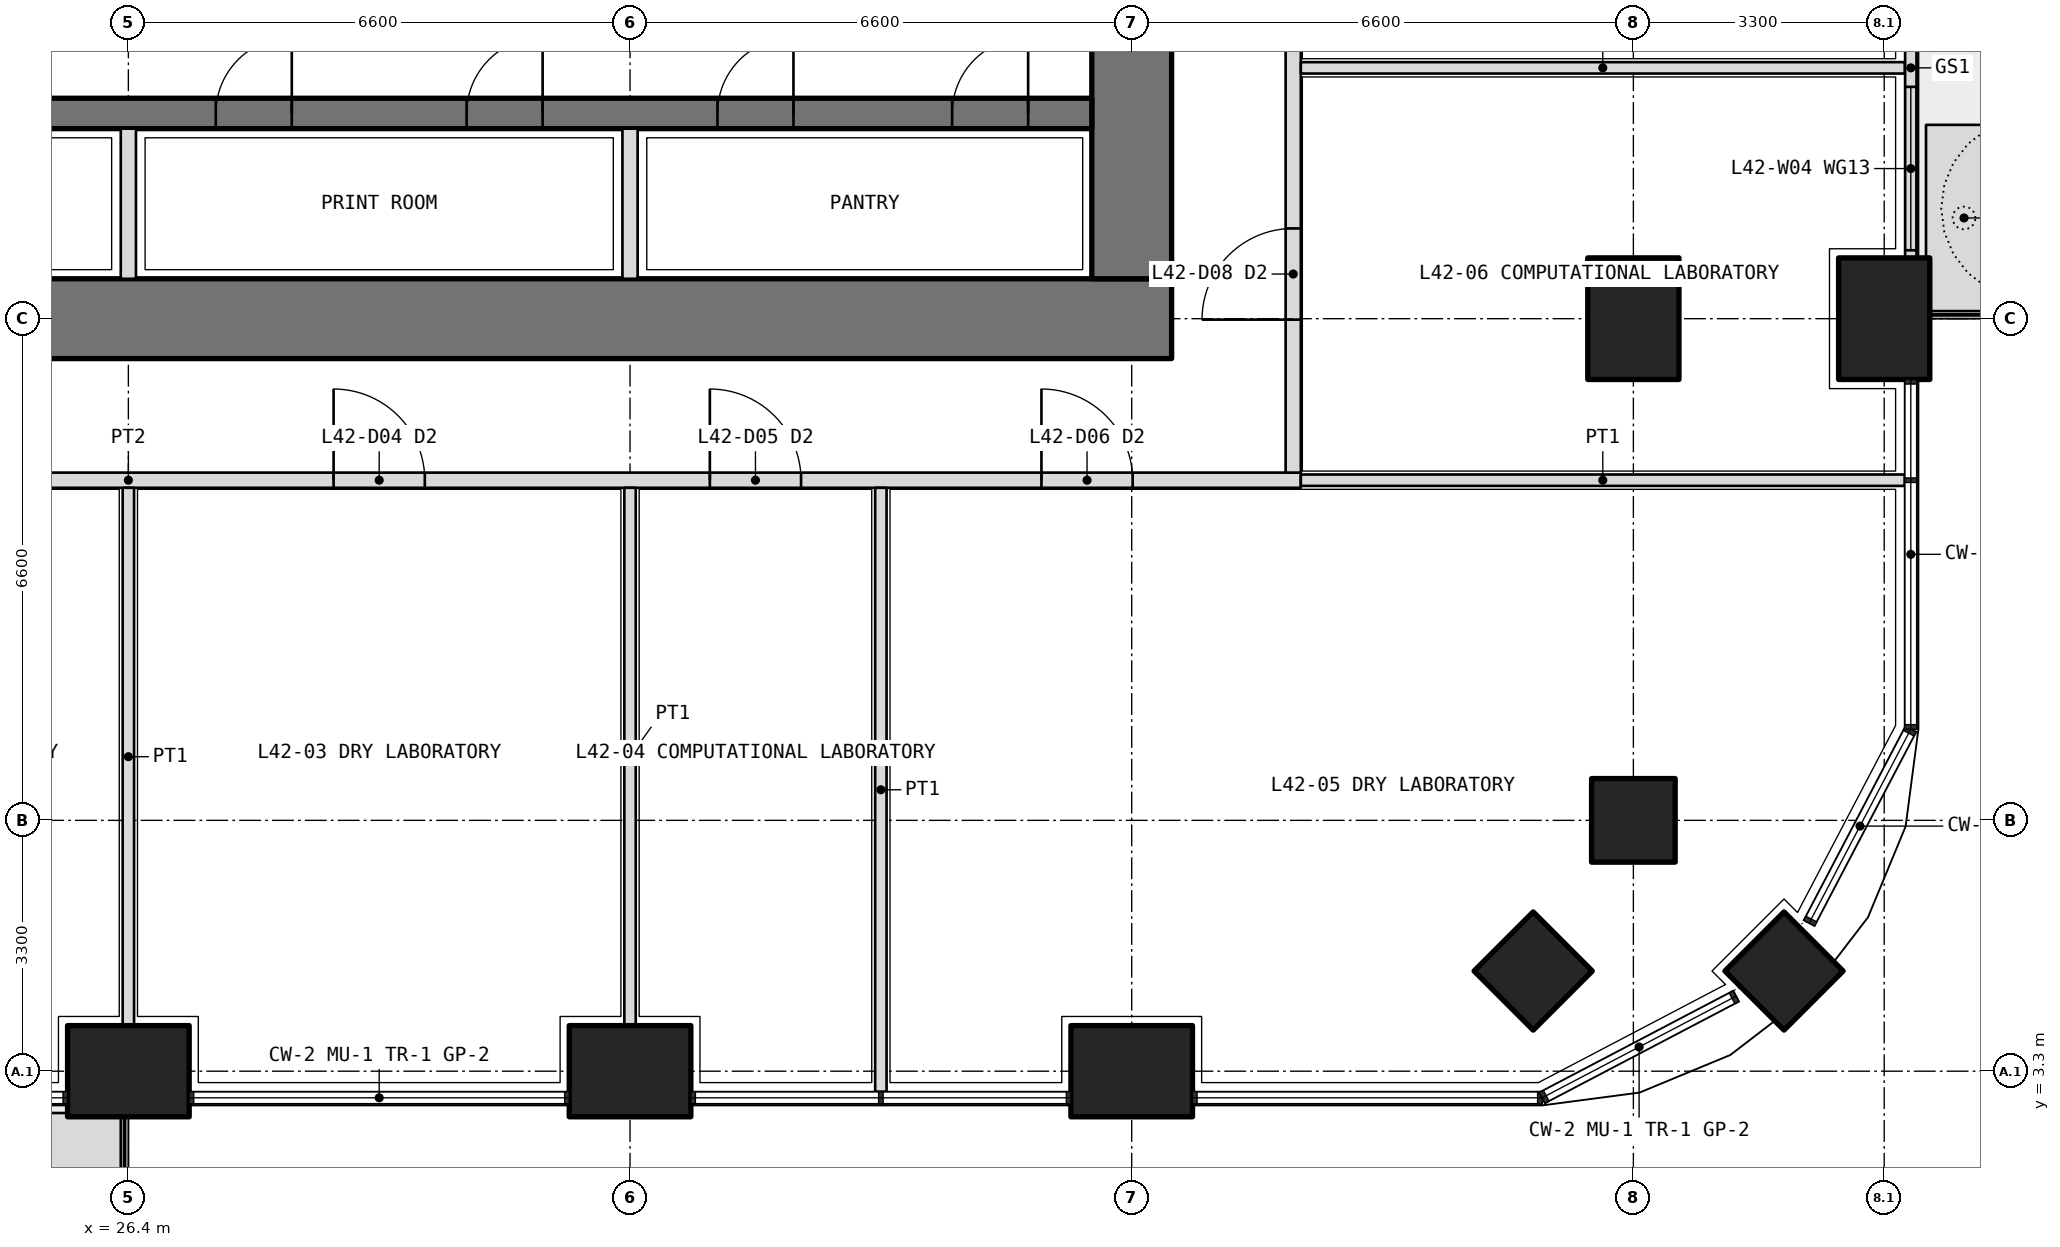
"""IFC4 building model, lengths in metres.
Left out: names, types, materials, properties, quantities, classifications, styles, units other than length and angle.
Written with IfcOpenShell. Run it as: python <this file> out.ifc"""

import sys

from ifc_helpers import new_model, si_unit, direction, frame, frame_2d, origin, origin_2d, place, context, subcontext, project, spatial, polyline, rectangle, outline, extrude, element, fill, save


model = new_model("IFC4")
c1 = context("Model", 3, precision=1e-05, world=origin(), true_north=direction((0.0, 1.0)))
c2 = subcontext(c1, "Body", "Model", "MODEL_VIEW")
j1 = project(units=[si_unit("LENGTHUNIT", "METRE"), si_unit("PLANEANGLEUNIT", "RADIAN")], contexts=[c1])
p1 = place(None, origin())
s1 = spatial("IfcSite", under=j1, at=p1, CompositionType="ELEMENT")
p2 = place(p1, origin())
s2 = spatial("IfcBuilding", under=s1, at=p2, CompositionType="ELEMENT")
p3 = place(p2, frame((0.0, 0.0, 185.1)))
s3 = spatial("IfcBuildingStorey", under=s2, at=p3, CompositionType="ELEMENT", Elevation=185.1)
p4 = place(p3, frame((48.182, 4.618, 0.0), z_axis=(0.0, 0.0, 1.0), x_axis=(0.707106781187, 0.707106781187, 0.0)))
e1 = element("IfcColumn", 1, at=p4, inside=s3, PredefinedType="COLUMN", context=c2, shape_type="SweptSolid", body=[
    extrude(rectangle(XDim=1.1, YDim=1.1, at=origin_2d()), origin(), (0.0, 0.0, 1.0), 4.2),
])
for number, where, z_axis, x_axis in (
    (2, (26.4, 3.3, 0.0), (0.0, 0.0, 1.0), (1.0, 0.0, 0.0)),
    (3, (33.0, 3.3, 0.0), (0.0, 0.0, 1.0), (1.0, 0.0, 0.0)),
    (4, (39.6, 3.3, 0.0), (0.0, 0.0, 1.0), (1.0, 0.0, 0.0)),
    (5, (49.5, 13.2, 0.0), (0.0, 0.0, 1.0), (0.0, 1.0, 0.0)),
):
    element("IfcColumn", number, at=place(p3, frame(where, z_axis=z_axis, x_axis=x_axis)), inside=s3, PredefinedType="COLUMN", context=c2, shape_type="SweptSolid", body=[
        extrude(rectangle(XDim=1.6, YDim=1.2, at=origin_2d()), origin(), (0.0, 0.0, 1.0), 4.2),
    ])
for number, where, z_axis, x_axis in (
    (6, (46.2, 6.6, 0.0), (0.0, 0.0, 1.0), (1.0, 0.0, 0.0)),
    (7, (44.882, 4.618, 0.0), (0.0, 0.0, 1.0), (0.707, 0.707, 0.0)),
):
    element("IfcColumn", number, at=place(p3, frame(where, z_axis=z_axis, x_axis=x_axis)), inside=s3, PredefinedType="COLUMN", context=c2, shape_type="SweptSolid", body=[
        extrude(rectangle(XDim=1.1, YDim=1.1, at=origin_2d()), origin(), (0.0, 0.0, 1.0), 4.2),
    ])
p5 = place(p3, frame((46.2, 13.2, 0.0), z_axis=(0.0, 0.0, 1.0), x_axis=(0.0, 1.0, 0.0)))
e8 = element("IfcColumn", 8, at=p5, inside=s3, PredefinedType="COLUMN", context=c2, shape_type="SweptSolid", body=[
    extrude(rectangle(XDim=1.6, YDim=1.2, at=origin_2d()), origin(), (0.0, 0.0, 1.0), 4.2),
])
p6 = place(p3, origin())
e9 = element("IfcWall", 9, at=p6, inside=s3, PredefinedType="USERDEFINED", context=c2, shape_type="SweptSolid", body=[
    extrude(outline(polyline([(17.25, 1.75), (26.3, 1.75), (26.3, 2.75), (17.25, 2.75), (17.25, 1.75)]), holes=[polyline([(17.4, 1.9), (26.15, 1.9), (26.15, 2.6), (17.4, 2.6), (17.4, 1.9)])]), origin(), (0.0, 0.0, 1.0), 1.05),
])
p7 = place(p3, origin())
e10 = element("IfcWall", 10, at=p7, inside=s3, PredefinedType="USERDEFINED", context=c2, shape_type="SweptSolid", body=[
    extrude(outline(polyline([(50.05, 13.3), (51.05, 13.3), (51.05, 15.75), (50.05, 15.75), (50.05, 13.3)]), holes=[polyline([(50.2, 13.45), (50.9, 13.45), (50.9, 15.6), (50.2, 15.6), (50.2, 13.45)])]), origin(), (0.0, 0.0, 1.0), 1.05),
])
p8 = place(p3, frame((49.85, 14.0, 0.0), z_axis=(0.0, 0.0, 1.0), x_axis=(0.0, 1.0, 0.0)))
e11 = element("IfcWall", 11, at=p8, inside=s3, PredefinedType="SOLIDWALL", context=c2, shape_type="SweptSolid", body=[
    extrude(rectangle(XDim=5.0, YDim=0.15, at=frame_2d((2.5, 0.0))), origin(), (0.0, 0.0, 1.0), 2.7),
])
p9 = place(p8, frame((2.75, 0.0, 0.0)))
e12 = element("IfcOpeningElement", 12, at=p9, cuts=e11, PredefinedType="OPENING", context=c2, shape_type="SweptSolid", body=[
    extrude(rectangle(XDim=1.0, YDim=2.4, at=frame_2d((0.5, 1.2))), frame((0.0, 0.085, 0.0), z_axis=(0.0, -1.0, 0.0), x_axis=(1.0, 0.0, 0.0)), (0.0, 0.0, 1.0), 0.17),
])
p10 = place(p8, frame((0.1, 0.0, 0.1)))
e13 = element("IfcOpeningElement", 13, at=p10, cuts=e11, PredefinedType="OPENING", context=c2, shape_type="SweptSolid", body=[
    extrude(rectangle(XDim=2.15, YDim=2.3, at=frame_2d((1.075, 1.15))), frame((0.0, 0.085, 0.0), z_axis=(0.0, -1.0, 0.0), x_axis=(1.0, 0.0, 0.0)), (0.0, 0.0, 1.0), 0.17),
])
p11 = place(p8, frame((3.85, 0.0, 0.1)))
e14 = element("IfcOpeningElement", 14, at=p11, cuts=e11, PredefinedType="OPENING", context=c2, shape_type="SweptSolid", body=[
    extrude(rectangle(XDim=1.05, YDim=2.3, at=frame_2d((0.525, 1.15))), frame((0.0, 0.085, 0.0), z_axis=(0.0, -1.0, 0.0), x_axis=(1.0, 0.0, 0.0)), (0.0, 0.0, 1.0), 0.17),
])
p12 = place(p3, frame((12.675, 13.2, 0.0), z_axis=(0.0, 0.0, 1.0), x_axis=(1.0, 0.0, 0.0)))
e15 = element("IfcWall", 15, at=p12, inside=s3, PredefinedType="SHEAR", context=c2, shape_type="SweptSolid", body=[
    extrude(rectangle(XDim=27.45, YDim=1.05, at=frame_2d((13.725, 0.0))), origin(), (0.0, 0.0, 1.0), 4.2),
])
p13 = place(p3, frame((39.6, 13.725, 0.0), z_axis=(0.0, 0.0, 1.0), x_axis=(0.0, 1.0, 0.0)))
e16 = element("IfcWall", 16, at=p13, inside=s3, PredefinedType="SHEAR", context=c2, shape_type="SweptSolid", body=[
    extrude(rectangle(XDim=18.75, YDim=1.05, at=frame_2d((9.375, 0.0))), origin(), (0.0, 0.0, 1.0), 4.2),
])
p14 = place(p13, frame((3.025, 0.0, 0.0)))
e17 = element("IfcOpeningElement", 17, at=p14, cuts=e16, PredefinedType="OPENING", context=c2, shape_type="SweptSolid", body=[
    extrude(rectangle(XDim=1.6, YDim=2.1, at=frame_2d((0.8, 1.05))), frame((0.0, 0.535, 0.0), z_axis=(0.0, -1.0, 0.0), x_axis=(1.0, 0.0, 0.0)), (0.0, 0.0, 1.0), 1.07),
])
p15 = place(p13, frame((13.825, 0.0, 0.0)))
e18 = element("IfcOpeningElement", 18, at=p15, cuts=e16, PredefinedType="OPENING", context=c2, shape_type="SweptSolid", body=[
    extrude(rectangle(XDim=1.6, YDim=2.1, at=frame_2d((0.8, 1.05))), frame((0.0, 0.535, 0.0), z_axis=(0.0, -1.0, 0.0), x_axis=(1.0, 0.0, 0.0)), (0.0, 0.0, 1.0), 1.07),
])
p16 = place(p3, frame((13.725, 15.9, 0.0), z_axis=(0.0, 0.0, 1.0), x_axis=(1.0, 0.0, 0.0)))
e19 = element("IfcWall", 19, at=p16, inside=s3, PredefinedType="SHEAR", context=c2, shape_type="SweptSolid", body=[
    extrude(rectangle(XDim=25.35, YDim=0.4, at=frame_2d((12.675, 0.0))), origin(), (0.0, 0.0, 1.0), 4.2),
])
p17 = place(p16, frame((0.837, 0.0, 0.0)))
e20 = element("IfcOpeningElement", 20, at=p17, cuts=e19, PredefinedType="OPENING", context=c2, shape_type="SweptSolid", body=[
    extrude(rectangle(XDim=1.0, YDim=2.1, at=frame_2d((0.5, 1.05))), frame((0.0, 0.21, 0.0), z_axis=(0.0, -1.0, 0.0), x_axis=(1.0, 0.0, 0.0)), (0.0, 0.0, 1.0), 0.42),
])
p18 = place(p16, frame((3.925, 0.0, 0.0)))
e21 = element("IfcOpeningElement", 21, at=p18, cuts=e19, PredefinedType="OPENING", context=c2, shape_type="SweptSolid", body=[
    extrude(rectangle(XDim=1.0, YDim=2.1, at=frame_2d((0.5, 1.05))), frame((0.0, 0.21, 0.0), z_axis=(0.0, -1.0, 0.0), x_axis=(1.0, 0.0, 0.0)), (0.0, 0.0, 1.0), 0.42),
])
p19 = place(p16, frame((7.225, 0.0, 0.0)))
e22 = element("IfcOpeningElement", 22, at=p19, cuts=e19, PredefinedType="OPENING", context=c2, shape_type="SweptSolid", body=[
    extrude(rectangle(XDim=1.0, YDim=2.1, at=frame_2d((0.5, 1.05))), frame((0.0, 0.21, 0.0), z_axis=(0.0, -1.0, 0.0), x_axis=(1.0, 0.0, 0.0)), (0.0, 0.0, 1.0), 0.42),
])
p20 = place(p16, frame((10.525, 0.0, 0.0)))
e23 = element("IfcOpeningElement", 23, at=p20, cuts=e19, PredefinedType="OPENING", context=c2, shape_type="SweptSolid", body=[
    extrude(rectangle(XDim=1.0, YDim=2.1, at=frame_2d((0.5, 1.05))), frame((0.0, 0.21, 0.0), z_axis=(0.0, -1.0, 0.0), x_axis=(1.0, 0.0, 0.0)), (0.0, 0.0, 1.0), 0.42),
])
p21 = place(p16, frame((13.825, 0.0, 0.0)))
e24 = element("IfcOpeningElement", 24, at=p21, cuts=e19, PredefinedType="OPENING", context=c2, shape_type="SweptSolid", body=[
    extrude(rectangle(XDim=1.0, YDim=2.1, at=frame_2d((0.5, 1.05))), frame((0.0, 0.21, 0.0), z_axis=(0.0, -1.0, 0.0), x_axis=(1.0, 0.0, 0.0)), (0.0, 0.0, 1.0), 0.42),
])
p22 = place(p16, frame((17.125, 0.0, 0.0)))
e25 = element("IfcOpeningElement", 25, at=p22, cuts=e19, PredefinedType="OPENING", context=c2, shape_type="SweptSolid", body=[
    extrude(rectangle(XDim=1.0, YDim=2.1, at=frame_2d((0.5, 1.05))), frame((0.0, 0.21, 0.0), z_axis=(0.0, -1.0, 0.0), x_axis=(1.0, 0.0, 0.0)), (0.0, 0.0, 1.0), 0.42),
])
p23 = place(p16, frame((20.425, 0.0, 0.0)))
e26 = element("IfcOpeningElement", 26, at=p23, cuts=e19, PredefinedType="OPENING", context=c2, shape_type="SweptSolid", body=[
    extrude(rectangle(XDim=1.0, YDim=2.1, at=frame_2d((0.5, 1.05))), frame((0.0, 0.21, 0.0), z_axis=(0.0, -1.0, 0.0), x_axis=(1.0, 0.0, 0.0)), (0.0, 0.0, 1.0), 0.42),
])
p24 = place(p16, frame((23.512, 0.0, 0.0)))
e27 = element("IfcOpeningElement", 27, at=p24, cuts=e19, PredefinedType="OPENING", context=c2, shape_type="SweptSolid", body=[
    extrude(rectangle(XDim=1.0, YDim=2.1, at=frame_2d((0.5, 1.05))), frame((0.0, 0.21, 0.0), z_axis=(0.0, -1.0, 0.0), x_axis=(1.0, 0.0, 0.0)), (0.0, 0.0, 1.0), 0.42),
])
for number, where, z_axis, x_axis in (
    (28, (26.4, 13.725, 0.0), (0.0, 0.0, 1.0), (0.0, 1.0, 0.0)),
    (29, (33.0, 13.725, 0.0), (0.0, 0.0, 1.0), (0.0, 1.0, 0.0)),
):
    element("IfcWall", number, at=place(p3, frame(where, z_axis=z_axis, x_axis=x_axis)), inside=s3, PredefinedType="PARTITIONING", context=c2, shape_type="SweptSolid", body=[
        extrude(rectangle(XDim=1.975, YDim=0.2, at=frame_2d((0.987, 0.0))), origin(), (0.0, 0.0, 1.0), 4.2),
    ])
p25 = place(p3, frame((10.975, 11.075, 0.0), z_axis=(0.0, 0.0, 1.0), x_axis=(1.0, 0.0, 0.0)))
e30 = element("IfcWall", 30, at=p25, inside=s3, PredefinedType="PARTITIONING", context=c2, shape_type="SweptSolid", body=[
    extrude(rectangle(XDim=30.85, YDim=0.2, at=frame_2d((15.425, 0.0))), origin(), (0.0, 0.0, 1.0), 2.85),
])
p26 = place(p25, frame((3.863, 0.0, 0.0)))
e31 = element("IfcOpeningElement", 31, at=p26, cuts=e30, PredefinedType="OPENING", context=c2, shape_type="SweptSolid", body=[
    extrude(rectangle(XDim=1.2, YDim=2.1, at=frame_2d((0.6, 1.05))), frame((0.0, 0.11, 0.0), z_axis=(0.0, -1.0, 0.0), x_axis=(1.0, 0.0, 0.0)), (0.0, 0.0, 1.0), 0.22),
])
p27 = place(p25, frame((11.525, 0.0, 0.0)))
e32 = element("IfcOpeningElement", 32, at=p27, cuts=e30, PredefinedType="OPENING", context=c2, shape_type="SweptSolid", body=[
    extrude(rectangle(XDim=1.2, YDim=2.1, at=frame_2d((0.6, 1.05))), frame((0.0, 0.11, 0.0), z_axis=(0.0, -1.0, 0.0), x_axis=(1.0, 0.0, 0.0)), (0.0, 0.0, 1.0), 0.22),
])
p28 = place(p25, frame((18.125, 0.0, 0.0)))
e33 = element("IfcOpeningElement", 33, at=p28, cuts=e30, PredefinedType="OPENING", context=c2, shape_type="SweptSolid", body=[
    extrude(rectangle(XDim=1.2, YDim=2.1, at=frame_2d((0.6, 1.05))), frame((0.0, 0.11, 0.0), z_axis=(0.0, -1.0, 0.0), x_axis=(1.0, 0.0, 0.0)), (0.0, 0.0, 1.0), 0.22),
])
p29 = place(p25, frame((23.075, 0.0, 0.0)))
e34 = element("IfcOpeningElement", 34, at=p29, cuts=e30, PredefinedType="OPENING", context=c2, shape_type="SweptSolid", body=[
    extrude(rectangle(XDim=1.2, YDim=2.1, at=frame_2d((0.6, 1.05))), frame((0.0, 0.11, 0.0), z_axis=(0.0, -1.0, 0.0), x_axis=(1.0, 0.0, 0.0)), (0.0, 0.0, 1.0), 0.22),
])
p30 = place(p25, frame((27.438, 0.0, 0.0)))
e35 = element("IfcOpeningElement", 35, at=p30, cuts=e30, PredefinedType="OPENING", context=c2, shape_type="SweptSolid", body=[
    extrude(rectangle(XDim=1.2, YDim=2.1, at=frame_2d((0.6, 1.05))), frame((0.0, 0.11, 0.0), z_axis=(0.0, -1.0, 0.0), x_axis=(1.0, 0.0, 0.0)), (0.0, 0.0, 1.0), 0.22),
])
p31 = place(p3, frame((41.725, 11.175, 0.0), z_axis=(0.0, 0.0, 1.0), x_axis=(0.0, 1.0, 0.0)))
e36 = element("IfcWall", 36, at=p31, inside=s3, PredefinedType="PARTITIONING", context=c2, shape_type="SweptSolid", body=[
    extrude(rectangle(XDim=23.85, YDim=0.2, at=frame_2d((11.925, 0.0))), origin(), (0.0, 0.0, 1.0), 2.85),
])
p32 = place(p31, frame((2.012, 0.0, 0.0)))
e37 = element("IfcOpeningElement", 37, at=p32, cuts=e36, PredefinedType="OPENING", context=c2, shape_type="SweptSolid", body=[
    extrude(rectangle(XDim=1.2, YDim=2.1, at=frame_2d((0.6, 1.05))), frame((0.0, 0.11, 0.0), z_axis=(0.0, -1.0, 0.0), x_axis=(1.0, 0.0, 0.0)), (0.0, 0.0, 1.0), 0.22),
])
p33 = place(p31, frame((6.375, 0.0, 0.0)))
e38 = element("IfcOpeningElement", 38, at=p33, cuts=e36, PredefinedType="OPENING", context=c2, shape_type="SweptSolid", body=[
    extrude(rectangle(XDim=1.2, YDim=2.1, at=frame_2d((0.6, 1.05))), frame((0.0, 0.11, 0.0), z_axis=(0.0, -1.0, 0.0), x_axis=(1.0, 0.0, 0.0)), (0.0, 0.0, 1.0), 0.22),
])
p34 = place(p31, frame((9.625, 0.0, 0.0)))
e39 = element("IfcOpeningElement", 39, at=p34, cuts=e36, PredefinedType="OPENING", context=c2, shape_type="SweptSolid", body=[
    extrude(rectangle(XDim=1.0, YDim=2.1, at=frame_2d((0.5, 1.05))), frame((0.0, 0.11, 0.0), z_axis=(0.0, -1.0, 0.0), x_axis=(1.0, 0.0, 0.0)), (0.0, 0.0, 1.0), 0.22),
])
p35 = place(p31, frame((12.975, 0.0, 0.0)))
e40 = element("IfcOpeningElement", 40, at=p35, cuts=e36, PredefinedType="OPENING", context=c2, shape_type="SweptSolid", body=[
    extrude(rectangle(XDim=0.9, YDim=2.1, at=frame_2d((0.45, 1.05))), frame((0.0, 0.11, 0.0), z_axis=(0.0, -1.0, 0.0), x_axis=(1.0, 0.0, 0.0)), (0.0, 0.0, 1.0), 0.22),
])
p36 = place(p31, frame((16.375, 0.0, 0.0)))
e41 = element("IfcOpeningElement", 41, at=p36, cuts=e36, PredefinedType="OPENING", context=c2, shape_type="SweptSolid", body=[
    extrude(rectangle(XDim=1.0, YDim=2.1, at=frame_2d((0.5, 1.05))), frame((0.0, 0.11, 0.0), z_axis=(0.0, -1.0, 0.0), x_axis=(1.0, 0.0, 0.0)), (0.0, 0.0, 1.0), 0.22),
])
p37 = place(p31, frame((20.637, 0.0, 0.0)))
e42 = element("IfcOpeningElement", 42, at=p37, cuts=e36, PredefinedType="OPENING", context=c2, shape_type="SweptSolid", body=[
    extrude(rectangle(XDim=1.2, YDim=2.1, at=frame_2d((0.6, 1.05))), frame((0.0, 0.11, 0.0), z_axis=(0.0, -1.0, 0.0), x_axis=(1.0, 0.0, 0.0)), (0.0, 0.0, 1.0), 0.22),
])
p38 = place(p3, frame((49.77, 11.075, 0.0), z_axis=(0.0, 0.0, 1.0), x_axis=(-1.0, 0.0, 0.0)))
e43 = element("IfcWall", 43, at=p38, inside=s3, PredefinedType="PARTITIONING", context=c2, shape_type="SweptSolid", body=[
    extrude(rectangle(XDim=7.945, YDim=0.15, at=frame_2d((3.973, 0.0))), origin(), (0.0, 0.0, 1.0), 2.7),
])
for number, where, z_axis, x_axis in (
    (44, (26.4, 3.9, 0.0), (0.0, 0.0, 1.0), (0.0, 1.0, 0.0)),
    (45, (33.0, 3.9, 0.0), (0.0, 0.0, 1.0), (0.0, 1.0, 0.0)),
):
    element("IfcWall", number, at=place(p3, frame(where, z_axis=z_axis, x_axis=x_axis)), inside=s3, PredefinedType="PARTITIONING", context=c2, shape_type="SweptSolid", body=[
        extrude(rectangle(XDim=7.075, YDim=0.15, at=frame_2d((3.538, 0.0))), origin(), (0.0, 0.0, 1.0), 2.85),
    ])
for number, where, z_axis, x_axis in (
    (46, (36.3, 3.03, 0.0), (0.0, 0.0, 1.0), (0.0, 1.0, 0.0)),
    (47, (49.77, 16.5, 0.0), (0.0, 0.0, 1.0), (-1.0, 0.0, 0.0)),
):
    element("IfcWall", number, at=place(p3, frame(where, z_axis=z_axis, x_axis=x_axis)), inside=s3, PredefinedType="PARTITIONING", context=c2, shape_type="SweptSolid", body=[
        extrude(rectangle(XDim=7.945, YDim=0.15, at=frame_2d((3.973, 0.0))), origin(), (0.0, 0.0, 1.0), 2.7),
    ])
p39 = place(p10, origin())
e48 = element("IfcWindow", 48, at=p39, inside=s3, PartitioningType="SINGLE_PANEL", PredefinedType="WINDOW", context=c2, shape_type="SweptSolid", body=[
    extrude(rectangle(XDim=2.15, YDim=2.3, at=frame_2d((1.075, 1.15))), frame((0.0, 0.03, 0.0), z_axis=(0.0, -1.0, 0.0), x_axis=(1.0, 0.0, 0.0)), (0.0, 0.0, 1.0), 0.06),
])
fill(e13, e48)
p40 = place(p28, origin())
e49 = element("IfcDoor", 49, at=p40, inside=s3, OperationType="DOUBLE_DOOR_SINGLE_SWING", PredefinedType="DOOR", context=c2, shape_type="SweptSolid", body=[
    extrude(rectangle(XDim=1.2, YDim=2.1, at=frame_2d((0.6, 1.05))), frame((0.0, 0.025, 0.0), z_axis=(0.0, -1.0, 0.0), x_axis=(1.0, 0.0, 0.0)), (0.0, 0.0, 1.0), 0.05),
])
fill(e33, e49)
p41 = place(p29, origin())
e50 = element("IfcDoor", 50, at=p41, inside=s3, OperationType="DOUBLE_DOOR_SINGLE_SWING", PredefinedType="DOOR", context=c2, shape_type="SweptSolid", body=[
    extrude(rectangle(XDim=1.2, YDim=2.1, at=frame_2d((0.6, 1.05))), frame((0.0, 0.025, 0.0), z_axis=(0.0, -1.0, 0.0), x_axis=(1.0, 0.0, 0.0)), (0.0, 0.0, 1.0), 0.05),
])
fill(e34, e50)
p42 = place(p30, origin())
e51 = element("IfcDoor", 51, at=p42, inside=s3, OperationType="DOUBLE_DOOR_SINGLE_SWING", PredefinedType="DOOR", context=c2, shape_type="SweptSolid", body=[
    extrude(rectangle(XDim=1.2, YDim=2.1, at=frame_2d((0.6, 1.05))), frame((0.0, 0.025, 0.0), z_axis=(0.0, -1.0, 0.0), x_axis=(1.0, 0.0, 0.0)), (0.0, 0.0, 1.0), 0.05),
])
fill(e35, e51)
p43 = place(p32, origin())
e52 = element("IfcDoor", 52, at=p43, inside=s3, OperationType="DOUBLE_DOOR_SINGLE_SWING", PredefinedType="DOOR", context=c2, shape_type="SweptSolid", body=[
    extrude(rectangle(XDim=1.2, YDim=2.1, at=frame_2d((0.6, 1.05))), frame((0.0, 0.025, 0.0), z_axis=(0.0, -1.0, 0.0), x_axis=(1.0, 0.0, 0.0)), (0.0, 0.0, 1.0), 0.05),
])
fill(e37, e52)
p44 = place(p21, origin())
e53 = element("IfcDoor", 53, at=p44, inside=s3, OperationType="SINGLE_SWING_RIGHT", PredefinedType="DOOR", context=c2, shape_type="SweptSolid", body=[
    extrude(rectangle(XDim=1.0, YDim=2.1, at=frame_2d((0.5, 1.05))), frame((0.0, 0.025, 0.0), z_axis=(0.0, -1.0, 0.0), x_axis=(1.0, 0.0, 0.0)), (0.0, 0.0, 1.0), 0.05),
])
fill(e24, e53)
p45 = place(p22, origin())
e54 = element("IfcDoor", 54, at=p45, inside=s3, OperationType="SINGLE_SWING_RIGHT", PredefinedType="DOOR", context=c2, shape_type="SweptSolid", body=[
    extrude(rectangle(XDim=1.0, YDim=2.1, at=frame_2d((0.5, 1.05))), frame((0.0, 0.025, 0.0), z_axis=(0.0, -1.0, 0.0), x_axis=(1.0, 0.0, 0.0)), (0.0, 0.0, 1.0), 0.05),
])
fill(e25, e54)
p46 = place(p23, origin())
e55 = element("IfcDoor", 55, at=p46, inside=s3, OperationType="SINGLE_SWING_RIGHT", PredefinedType="DOOR", context=c2, shape_type="SweptSolid", body=[
    extrude(rectangle(XDim=1.0, YDim=2.1, at=frame_2d((0.5, 1.05))), frame((0.0, 0.025, 0.0), z_axis=(0.0, -1.0, 0.0), x_axis=(1.0, 0.0, 0.0)), (0.0, 0.0, 1.0), 0.05),
])
fill(e26, e55)
p47 = place(p24, origin())
e56 = element("IfcDoor", 56, at=p47, inside=s3, OperationType="SINGLE_SWING_RIGHT", PredefinedType="DOOR", context=c2, shape_type="SweptSolid", body=[
    extrude(rectangle(XDim=1.0, YDim=2.1, at=frame_2d((0.5, 1.05))), frame((0.0, 0.025, 0.0), z_axis=(0.0, -1.0, 0.0), x_axis=(1.0, 0.0, 0.0)), (0.0, 0.0, 1.0), 0.05),
])
fill(e27, e56)
save(model, sys.argv[1])
